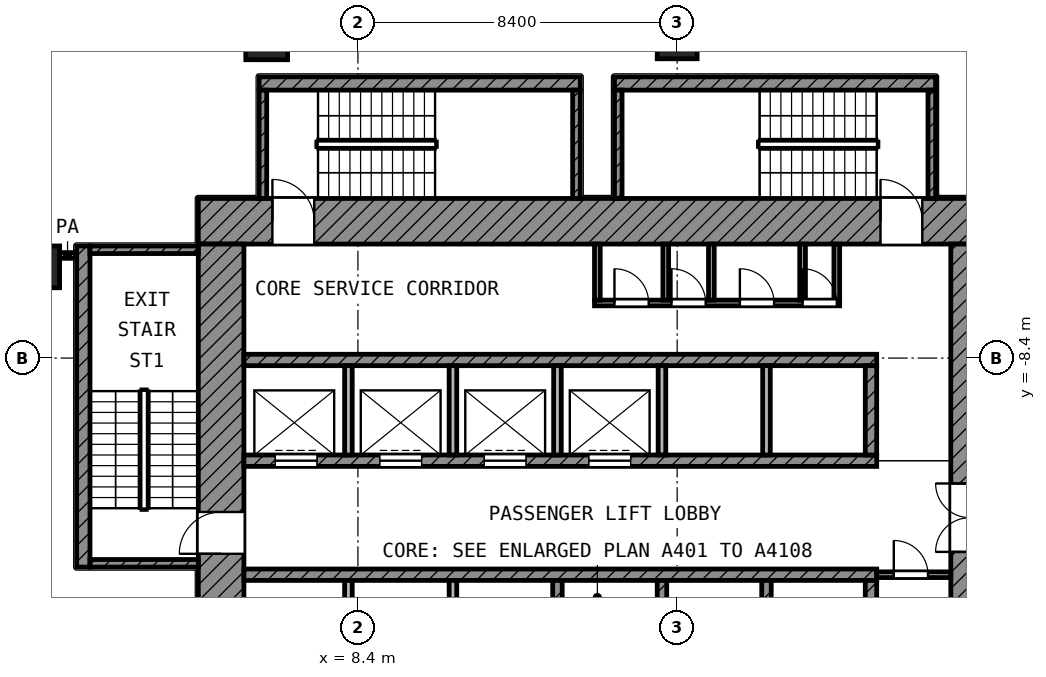
"""IFC4 building model, lengths in metres.
Left out: names, types, materials, properties, quantities, classifications, styles, units other than length and angle.
Written with IfcOpenShell. Run it as: python <this file> out.ifc"""

import sys

from ifc_helpers import new_model, si_unit, direction, frame, frame_2d, origin, origin_2d, place, context, subcontext, project, spatial, rectangle, extrude, element, fill, save


model = new_model("IFC4")
c1 = context("Model", 3, precision=1e-05, world=origin(), true_north=direction((0.0, 1.0)))
c2 = subcontext(c1, "Body", "Model", "MODEL_VIEW")
j1 = project(units=[si_unit("LENGTHUNIT", "METRE"), si_unit("PLANEANGLEUNIT", "RADIAN")], contexts=[c1])
p1 = place(None, origin())
s1 = spatial("IfcSite", under=j1, at=p1, CompositionType="ELEMENT")
p2 = place(p1, origin())
s2 = spatial("IfcBuilding", under=s1, at=p2, CompositionType="ELEMENT")
p3 = place(p2, frame((0.0, 0.0, 149.2)))
s3 = spatial("IfcBuildingStorey", under=s2, at=p3, CompositionType="ELEMENT", Elevation=149.2)
p4 = place(p3, frame((6.0, 0.0, 0.0), z_axis=(0.0, 0.0, 1.0), x_axis=(1.0, 0.0, 0.0)))
e1 = element("IfcColumn", 1, at=p4, inside=s3, PredefinedType="COLUMN", context=c2, shape_type="SweptSolid", body=[
    extrude(rectangle(XDim=1.1, YDim=1.1, at=origin_2d()), origin(), (0.0, 0.0, 1.0), 4.2),
])
p5 = place(p3, frame((16.8, 0.0, 0.0), z_axis=(0.0, 0.0, 1.0), x_axis=(1.0, 0.0, 0.0)))
e2 = element("IfcColumn", 2, at=p5, inside=s3, PredefinedType="COLUMN", context=c2, shape_type="SweptSolid", body=[
    extrude(rectangle(XDim=1.05, YDim=1.05, at=origin_2d()), origin(), (0.0, 0.0, 1.0), 4.2),
])
p6 = place(p3, frame((0.0, -6.0, 0.0), z_axis=(0.0, 0.0, 1.0), x_axis=(1.0, 0.0, 0.0)))
e3 = element("IfcColumn", 3, at=p6, inside=s3, PredefinedType="COLUMN", context=c2, shape_type="SweptSolid", body=[
    extrude(rectangle(XDim=1.1, YDim=1.1, at=origin_2d()), origin(), (0.0, 0.0, 1.0), 4.2),
])
p7 = place(p3, frame((4.2, -4.8, 0.0), z_axis=(0.0, 0.0, 1.0), x_axis=(1.0, 0.0, 0.0)))
e4 = element("IfcWall", 4, at=p7, inside=s3, PredefinedType="SHEAR", context=c2, shape_type="SweptSolid", body=[
    extrude(rectangle(XDim=20.8, YDim=1.2, at=frame_2d((10.4, 0.0))), origin(), (0.0, 0.0, 1.0), 3.7),
])
p8 = place(p7, frame((1.95, 0.0, 0.0)))
e5 = element("IfcOpeningElement", 5, at=p8, cuts=e4, PredefinedType="OPENING", context=c2, shape_type="SweptSolid", body=[
    extrude(rectangle(XDim=1.1, YDim=2.1, at=frame_2d((0.55, 1.05))), frame((0.0, 0.61, 0.0), z_axis=(0.0, -1.0, 0.0), x_axis=(1.0, 0.0, 0.0)), (0.0, 0.0, 1.0), 1.22),
])
p9 = place(p7, frame((17.95, 0.0, 0.0)))
e6 = element("IfcOpeningElement", 6, at=p9, cuts=e4, PredefinedType="OPENING", context=c2, shape_type="SweptSolid", body=[
    extrude(rectangle(XDim=1.1, YDim=2.1, at=frame_2d((0.55, 1.05))), frame((0.0, 0.61, 0.0), z_axis=(0.0, -1.0, 0.0), x_axis=(1.0, 0.0, 0.0)), (0.0, 0.0, 1.0), 1.22),
])
p10 = place(p3, frame((4.8, -25.0, 0.0), z_axis=(0.0, 0.0, 1.0), x_axis=(0.0, 1.0, 0.0)))
e7 = element("IfcWall", 7, at=p10, inside=s3, PredefinedType="SHEAR", context=c2, shape_type="SweptSolid", body=[
    extrude(rectangle(XDim=19.6, YDim=1.2, at=frame_2d((9.8, 0.0))), origin(), (0.0, 0.0, 1.0), 3.7),
])
p11 = place(p10, frame((11.45, 0.0, 0.0)))
e8 = element("IfcOpeningElement", 8, at=p11, cuts=e7, PredefinedType="OPENING", context=c2, shape_type="SweptSolid", body=[
    extrude(rectangle(XDim=1.1, YDim=2.1, at=frame_2d((0.55, 1.05))), frame((0.0, 0.61, 0.0), z_axis=(0.0, -1.0, 0.0), x_axis=(1.0, 0.0, 0.0)), (0.0, 0.0, 1.0), 1.22),
])
p12 = place(p10, frame((2.15, 0.0, 0.0)))
e9 = element("IfcOpeningElement", 9, at=p12, cuts=e7, PredefinedType="OPENING", context=c2, shape_type="SweptSolid", body=[
    extrude(rectangle(XDim=1.1, YDim=2.1, at=frame_2d((0.55, 1.05))), frame((0.0, 0.61, 0.0), z_axis=(0.0, -1.0, 0.0), x_axis=(1.0, 0.0, 0.0)), (0.0, 0.0, 1.0), 1.22),
])
p13 = place(p3, frame((24.5, -24.0, 0.0), z_axis=(0.0, 0.0, 1.0), x_axis=(0.0, 1.0, 0.0)))
e10 = element("IfcWall", 10, at=p13, inside=s3, PredefinedType="SHEAR", context=c2, shape_type="SweptSolid", body=[
    extrude(rectangle(XDim=18.6, YDim=1.0, at=frame_2d((9.3, 0.0))), origin(), (0.0, 0.0, 1.0), 3.7),
])
p14 = place(p13, frame((10.5, 0.0, 0.0)))
e11 = element("IfcOpeningElement", 11, at=p14, cuts=e10, PredefinedType="OPENING", context=c2, shape_type="SweptSolid", body=[
    extrude(rectangle(XDim=1.8, YDim=2.1, at=frame_2d((0.9, 1.05))), frame((0.0, 0.51, 0.0), z_axis=(0.0, -1.0, 0.0), x_axis=(1.0, 0.0, 0.0)), (0.0, 0.0, 1.0), 1.02),
])
p15 = place(p3, frame((5.4, -8.45, 0.0), z_axis=(0.0, 0.0, 1.0), x_axis=(1.0, 0.0, 0.0)))
e12 = element("IfcWall", 12, at=p15, inside=s3, PredefinedType="SHEAR", context=c2, shape_type="SweptSolid", body=[
    extrude(rectangle(XDim=16.65, YDim=0.3, at=frame_2d((8.325, 0.0))), origin(), (0.0, 0.0, 1.0), 3.7),
])
p16 = place(p3, frame((5.4, -11.1, 0.0), z_axis=(0.0, 0.0, 1.0), x_axis=(1.0, 0.0, 0.0)))
e13 = element("IfcWall", 13, at=p16, inside=s3, PredefinedType="SHEAR", context=c2, shape_type="SweptSolid", body=[
    extrude(rectangle(XDim=16.65, YDim=0.3, at=frame_2d((8.325, 0.0))), origin(), (0.0, 0.0, 1.0), 3.7),
])
p17 = place(p16, frame((0.825, 0.0, 0.0)))
e14 = element("IfcOpeningElement", 14, at=p17, cuts=e13, PredefinedType="OPENING", context=c2, shape_type="SweptSolid", body=[
    extrude(rectangle(XDim=1.1, YDim=2.1, at=frame_2d((0.55, 1.05))), frame((0.0, 0.16, 0.0), z_axis=(0.0, -1.0, 0.0), x_axis=(1.0, 0.0, 0.0)), (0.0, 0.0, 1.0), 0.32),
])
p18 = place(p16, frame((3.575, 0.0, 0.0)))
e15 = element("IfcOpeningElement", 15, at=p18, cuts=e13, PredefinedType="OPENING", context=c2, shape_type="SweptSolid", body=[
    extrude(rectangle(XDim=1.1, YDim=2.1, at=frame_2d((0.55, 1.05))), frame((0.0, 0.16, 0.0), z_axis=(0.0, -1.0, 0.0), x_axis=(1.0, 0.0, 0.0)), (0.0, 0.0, 1.0), 0.32),
])
p19 = place(p16, frame((6.325, 0.0, 0.0)))
e16 = element("IfcOpeningElement", 16, at=p19, cuts=e13, PredefinedType="OPENING", context=c2, shape_type="SweptSolid", body=[
    extrude(rectangle(XDim=1.1, YDim=2.1, at=frame_2d((0.55, 1.05))), frame((0.0, 0.16, 0.0), z_axis=(0.0, -1.0, 0.0), x_axis=(1.0, 0.0, 0.0)), (0.0, 0.0, 1.0), 0.32),
])
p20 = place(p16, frame((9.075, 0.0, 0.0)))
e17 = element("IfcOpeningElement", 17, at=p20, cuts=e13, PredefinedType="OPENING", context=c2, shape_type="SweptSolid", body=[
    extrude(rectangle(XDim=1.1, YDim=2.1, at=frame_2d((0.55, 1.05))), frame((0.0, 0.16, 0.0), z_axis=(0.0, -1.0, 0.0), x_axis=(1.0, 0.0, 0.0)), (0.0, 0.0, 1.0), 0.32),
])
p21 = place(p3, frame((5.4, -14.1, 0.0), z_axis=(0.0, 0.0, 1.0), x_axis=(1.0, 0.0, 0.0)))
e18 = element("IfcWall", 18, at=p21, inside=s3, PredefinedType="SHEAR", context=c2, shape_type="SweptSolid", body=[
    extrude(rectangle(XDim=16.65, YDim=0.3, at=frame_2d((8.325, 0.0))), origin(), (0.0, 0.0, 1.0), 3.7),
])
p22 = place(p3, frame((21.9, -10.95, 0.0), z_axis=(0.0, 0.0, 1.0), x_axis=(0.0, 1.0, 0.0)))
e19 = element("IfcWall", 19, at=p22, inside=s3, PredefinedType="SHEAR", context=c2, shape_type="SweptSolid", body=[
    extrude(rectangle(XDim=2.35, YDim=0.3, at=frame_2d((1.175, 0.0))), origin(), (0.0, 0.0, 1.0), 3.7),
])
p23 = place(p3, frame((21.9, -16.6, 0.0), z_axis=(0.0, 0.0, 1.0), x_axis=(0.0, 1.0, 0.0)))
e20 = element("IfcWall", 20, at=p23, inside=s3, PredefinedType="SHEAR", context=c2, shape_type="SweptSolid", body=[
    extrude(rectangle(XDim=2.35, YDim=0.3, at=frame_2d((1.175, 0.0))), origin(), (0.0, 0.0, 1.0), 3.7),
])
for number, where, z_axis, x_axis in (
    (21, (8.15, -10.95, 0.0), (0.0, 0.0, 1.0), (0.0, 1.0, 0.0)),
    (22, (10.9, -10.95, 0.0), (0.0, 0.0, 1.0), (0.0, 1.0, 0.0)),
    (23, (13.65, -10.95, 0.0), (0.0, 0.0, 1.0), (0.0, 1.0, 0.0)),
    (24, (16.4, -10.95, 0.0), (0.0, 0.0, 1.0), (0.0, 1.0, 0.0)),
    (25, (19.15, -10.95, 0.0), (0.0, 0.0, 1.0), (0.0, 1.0, 0.0)),
):
    element("IfcWall", number, at=place(p3, frame(where, z_axis=z_axis, x_axis=x_axis)), inside=s3, PredefinedType="PARTITIONING", context=c2, shape_type="SweptSolid", body=[
        extrude(rectangle(XDim=2.35, YDim=0.2, at=frame_2d((1.175, 0.0))), origin(), (0.0, 0.0, 1.0), 3.7),
    ])
for number, where, z_axis, x_axis in (
    (26, (8.15, -16.6, 0.0), (0.0, 0.0, 1.0), (0.0, 1.0, 0.0)),
    (27, (10.9, -16.6, 0.0), (0.0, 0.0, 1.0), (0.0, 1.0, 0.0)),
):
    element("IfcWall", number, at=place(p3, frame(where, z_axis=z_axis, x_axis=x_axis)), inside=s3, PredefinedType="PARTITIONING", context=c2, shape_type="SweptSolid", body=[
        extrude(rectangle(XDim=2.35, YDim=0.2, at=frame_2d((1.175, 0.0))), origin(), (0.0, 0.0, 1.0), 3.7),
    ])
for number, where, z_axis, x_axis in (
    (28, (13.65, -16.6, 0.0), (0.0, 0.0, 1.0), (0.0, 1.0, 0.0)),
    (29, (16.4, -16.6, 0.0), (0.0, 0.0, 1.0), (0.0, 1.0, 0.0)),
    (30, (19.15, -16.6, 0.0), (0.0, 0.0, 1.0), (0.0, 1.0, 0.0)),
):
    element("IfcWall", number, at=place(p3, frame(where, z_axis=z_axis, x_axis=x_axis)), inside=s3, PredefinedType="SHEAR", context=c2, shape_type="SweptSolid", body=[
        extrude(rectangle(XDim=2.35, YDim=0.25, at=frame_2d((1.175, 0.0))), origin(), (0.0, 0.0, 1.0), 3.7),
    ])
p24 = place(p3, frame((22.05, -14.1, 0.0), z_axis=(0.0, 0.0, 1.0), x_axis=(1.0, 0.0, 0.0)))
e31 = element("IfcWall", 31, at=p24, inside=s3, PredefinedType="PARTITIONING", context=c2, shape_type="SweptSolid", body=[
    extrude(rectangle(XDim=1.95, YDim=0.15, at=frame_2d((0.975, 0.0))), origin(), (0.0, 0.0, 1.0), 3.7),
])
p25 = place(p24, frame((0.45, 0.0, 0.0)))
e32 = element("IfcOpeningElement", 32, at=p25, cuts=e31, PredefinedType="OPENING", context=c2, shape_type="SweptSolid", body=[
    extrude(rectangle(XDim=0.9, YDim=2.1, at=frame_2d((0.45, 1.05))), frame((0.0, 0.085, 0.0), z_axis=(0.0, -1.0, 0.0), x_axis=(1.0, 0.0, 0.0)), (0.0, 0.0, 1.0), 0.17),
])
p26 = place(p3, frame((14.625, -6.95, 0.0), z_axis=(0.0, 0.0, 1.0), x_axis=(1.0, 0.0, 0.0)))
e33 = element("IfcWall", 33, at=p26, inside=s3, PredefinedType="PARTITIONING", context=c2, shape_type="SweptSolid", body=[
    extrude(rectangle(XDim=6.45, YDim=0.15, at=frame_2d((3.225, 0.0))), origin(), (0.0, 0.0, 1.0), 3.7),
])
p27 = place(p26, frame((0.525, 0.0, 0.0)))
e34 = element("IfcOpeningElement", 34, at=p27, cuts=e33, PredefinedType="OPENING", context=c2, shape_type="SweptSolid", body=[
    extrude(rectangle(XDim=0.9, YDim=2.1, at=frame_2d((0.45, 1.05))), frame((0.0, 0.085, 0.0), z_axis=(0.0, -1.0, 0.0), x_axis=(1.0, 0.0, 0.0)), (0.0, 0.0, 1.0), 0.17),
])
p28 = place(p26, frame((2.025, 0.0, 0.0)))
e35 = element("IfcOpeningElement", 35, at=p28, cuts=e33, PredefinedType="OPENING", context=c2, shape_type="SweptSolid", body=[
    extrude(rectangle(XDim=0.9, YDim=2.1, at=frame_2d((0.45, 1.05))), frame((0.0, 0.085, 0.0), z_axis=(0.0, -1.0, 0.0), x_axis=(1.0, 0.0, 0.0)), (0.0, 0.0, 1.0), 0.17),
])
p29 = place(p26, frame((3.825, 0.0, 0.0)))
e36 = element("IfcOpeningElement", 36, at=p29, cuts=e33, PredefinedType="OPENING", context=c2, shape_type="SweptSolid", body=[
    extrude(rectangle(XDim=0.9, YDim=2.1, at=frame_2d((0.45, 1.05))), frame((0.0, 0.085, 0.0), z_axis=(0.0, -1.0, 0.0), x_axis=(1.0, 0.0, 0.0)), (0.0, 0.0, 1.0), 0.17),
])
p30 = place(p26, frame((5.475, 0.0, 0.0)))
e37 = element("IfcOpeningElement", 37, at=p30, cuts=e33, PredefinedType="OPENING", context=c2, shape_type="SweptSolid", body=[
    extrude(rectangle(XDim=0.9, YDim=2.1, at=frame_2d((0.45, 1.05))), frame((0.0, 0.085, 0.0), z_axis=(0.0, -1.0, 0.0), x_axis=(1.0, 0.0, 0.0)), (0.0, 0.0, 1.0), 0.17),
])
for number, where, z_axis, x_axis in (
    (38, (14.7, -6.875, 0.0), (0.0, 0.0, 1.0), (0.0, 1.0, 0.0)),
    (39, (16.5, -6.875, 0.0), (0.0, 0.0, 1.0), (0.0, 1.0, 0.0)),
    (40, (17.7, -6.875, 0.0), (0.0, 0.0, 1.0), (0.0, 1.0, 0.0)),
    (41, (20.1, -6.875, 0.0), (0.0, 0.0, 1.0), (0.0, 1.0, 0.0)),
    (42, (21.0, -6.875, 0.0), (0.0, 0.0, 1.0), (0.0, 1.0, 0.0)),
):
    element("IfcWall", number, at=place(p3, frame(where, z_axis=z_axis, x_axis=x_axis)), inside=s3, PredefinedType="PARTITIONING", context=c2, shape_type="SweptSolid", body=[
        extrude(rectangle(XDim=1.475, YDim=0.15, at=frame_2d((0.738, 0.0))), origin(), (0.0, 0.0, 1.0), 3.7),
    ])
p31 = place(p3, frame((1.175, -13.9, 0.0), z_axis=(0.0, 0.0, 1.0), x_axis=(0.0, 1.0, 0.0)))
e43 = element("IfcWall", 43, at=p31, inside=s3, PredefinedType="SHEAR", context=c2, shape_type="SweptSolid", body=[
    extrude(rectangle(XDim=8.45, YDim=0.35, at=frame_2d((4.225, 0.0))), origin(), (0.0, 0.0, 1.0), 3.7),
])
for number, where, z_axis, x_axis in (
    (44, (1.35, -5.55, 0.0), (0.0, 0.0, 1.0), (1.0, 0.0, 0.0)),
    (45, (1.35, -13.8, 0.0), (0.0, 0.0, 1.0), (1.0, 0.0, 0.0)),
):
    element("IfcWall", number, at=place(p3, frame(where, z_axis=z_axis, x_axis=x_axis)), inside=s3, PredefinedType="SHEAR", context=c2, shape_type="SweptSolid", body=[
        extrude(rectangle(XDim=2.85, YDim=0.2, at=frame_2d((1.425, 0.0))), origin(), (0.0, 0.0, 1.0), 3.7),
    ])
p32 = place(p3, frame((5.8, -1.175, 0.0), z_axis=(0.0, 0.0, 1.0), x_axis=(1.0, 0.0, 0.0)))
e46 = element("IfcWall", 46, at=p32, inside=s3, PredefinedType="SHEAR", context=c2, shape_type="SweptSolid", body=[
    extrude(rectangle(XDim=8.45, YDim=0.35, at=frame_2d((4.225, 0.0))), origin(), (0.0, 0.0, 1.0), 3.7),
])
for number, where, z_axis, x_axis in (
    (47, (5.9, -4.2, 0.0), (0.0, 0.0, 1.0), (0.0, 1.0, 0.0)),
    (48, (14.15, -4.2, 0.0), (0.0, 0.0, 1.0), (0.0, 1.0, 0.0)),
):
    element("IfcWall", number, at=place(p3, frame(where, z_axis=z_axis, x_axis=x_axis)), inside=s3, PredefinedType="SHEAR", context=c2, shape_type="SweptSolid", body=[
        extrude(rectangle(XDim=2.85, YDim=0.2, at=frame_2d((1.425, 0.0))), origin(), (0.0, 0.0, 1.0), 3.7),
    ])
p33 = place(p3, frame((15.15, -1.175, 0.0), z_axis=(0.0, 0.0, 1.0), x_axis=(1.0, 0.0, 0.0)))
e49 = element("IfcWall", 49, at=p33, inside=s3, PredefinedType="SHEAR", context=c2, shape_type="SweptSolid", body=[
    extrude(rectangle(XDim=8.45, YDim=0.35, at=frame_2d((4.225, 0.0))), origin(), (0.0, 0.0, 1.0), 3.7),
])
for number, where, z_axis, x_axis in (
    (50, (15.25, -4.2, 0.0), (0.0, 0.0, 1.0), (0.0, 1.0, 0.0)),
    (51, (23.5, -4.2, 0.0), (0.0, 0.0, 1.0), (0.0, 1.0, 0.0)),
):
    element("IfcWall", number, at=place(p3, frame(where, z_axis=z_axis, x_axis=x_axis)), inside=s3, PredefinedType="SHEAR", context=c2, shape_type="SweptSolid", body=[
        extrude(rectangle(XDim=2.85, YDim=0.2, at=frame_2d((1.425, 0.0))), origin(), (0.0, 0.0, 1.0), 3.7),
    ])
p34 = place(p3, frame((0.55, -5.7, 0.0), z_axis=(0.0, 0.0, 1.0), x_axis=(1.0, 0.0, 0.0)))
e52 = element("IfcWall", 52, at=p34, inside=s3, PredefinedType="PARTITIONING", context=c2, shape_type="SweptSolid", body=[
    extrude(rectangle(XDim=0.42, YDim=0.15, at=frame_2d((0.21, 0.0))), origin(), (0.0, 0.0, 1.0), 3.7),
])
p35 = place(p17, origin())
e53 = element("IfcDoor", 53, at=p35, inside=s3, OperationType="DOUBLE_DOOR_SLIDING", PredefinedType="DOOR", context=c2, shape_type="SweptSolid", body=[
    extrude(rectangle(XDim=1.1, YDim=2.1, at=frame_2d((0.55, 1.05))), frame((0.0, 0.025, 0.0), z_axis=(0.0, -1.0, 0.0), x_axis=(1.0, 0.0, 0.0)), (0.0, 0.0, 1.0), 0.05),
])
fill(e14, e53)
p36 = place(p18, origin())
e54 = element("IfcDoor", 54, at=p36, inside=s3, OperationType="DOUBLE_DOOR_SLIDING", PredefinedType="DOOR", context=c2, shape_type="SweptSolid", body=[
    extrude(rectangle(XDim=1.1, YDim=2.1, at=frame_2d((0.55, 1.05))), frame((0.0, 0.025, 0.0), z_axis=(0.0, -1.0, 0.0), x_axis=(1.0, 0.0, 0.0)), (0.0, 0.0, 1.0), 0.05),
])
fill(e15, e54)
p37 = place(p19, origin())
e55 = element("IfcDoor", 55, at=p37, inside=s3, OperationType="DOUBLE_DOOR_SLIDING", PredefinedType="DOOR", context=c2, shape_type="SweptSolid", body=[
    extrude(rectangle(XDim=1.1, YDim=2.1, at=frame_2d((0.55, 1.05))), frame((0.0, 0.025, 0.0), z_axis=(0.0, -1.0, 0.0), x_axis=(1.0, 0.0, 0.0)), (0.0, 0.0, 1.0), 0.05),
])
fill(e16, e55)
p38 = place(p20, origin())
e56 = element("IfcDoor", 56, at=p38, inside=s3, OperationType="DOUBLE_DOOR_SLIDING", PredefinedType="DOOR", context=c2, shape_type="SweptSolid", body=[
    extrude(rectangle(XDim=1.1, YDim=2.1, at=frame_2d((0.55, 1.05))), frame((0.0, 0.025, 0.0), z_axis=(0.0, -1.0, 0.0), x_axis=(1.0, 0.0, 0.0)), (0.0, 0.0, 1.0), 0.05),
])
fill(e17, e56)
p39 = place(p11, origin())
e57 = element("IfcDoor", 57, at=p39, inside=s3, OperationType="SINGLE_SWING_LEFT", PredefinedType="DOOR", context=c2, shape_type="SweptSolid", body=[
    extrude(rectangle(XDim=1.1, YDim=2.1, at=frame_2d((0.55, 1.05))), frame((0.0, 0.025, 0.0), z_axis=(0.0, -1.0, 0.0), x_axis=(1.0, 0.0, 0.0)), (0.0, 0.0, 1.0), 0.05),
])
fill(e8, e57)
p40 = place(p8, origin())
e58 = element("IfcDoor", 58, at=p40, inside=s3, OperationType="SINGLE_SWING_LEFT", PredefinedType="DOOR", context=c2, shape_type="SweptSolid", body=[
    extrude(rectangle(XDim=1.1, YDim=2.1, at=frame_2d((0.55, 1.05))), frame((0.0, 0.025, 0.0), z_axis=(0.0, -1.0, 0.0), x_axis=(1.0, 0.0, 0.0)), (0.0, 0.0, 1.0), 0.05),
])
fill(e5, e58)
p41 = place(p9, origin())
e59 = element("IfcDoor", 59, at=p41, inside=s3, OperationType="SINGLE_SWING_LEFT", PredefinedType="DOOR", context=c2, shape_type="SweptSolid", body=[
    extrude(rectangle(XDim=1.1, YDim=2.1, at=frame_2d((0.55, 1.05))), frame((0.0, 0.025, 0.0), z_axis=(0.0, -1.0, 0.0), x_axis=(1.0, 0.0, 0.0)), (0.0, 0.0, 1.0), 0.05),
])
fill(e6, e59)
p42 = place(p27, origin())
e60 = element("IfcDoor", 60, at=p42, inside=s3, OperationType="SINGLE_SWING_LEFT", PredefinedType="DOOR", context=c2, shape_type="SweptSolid", body=[
    extrude(rectangle(XDim=0.9, YDim=2.1, at=frame_2d((0.45, 1.05))), frame((0.0, 0.025, 0.0), z_axis=(0.0, -1.0, 0.0), x_axis=(1.0, 0.0, 0.0)), (0.0, 0.0, 1.0), 0.05),
])
fill(e34, e60)
p43 = place(p28, origin())
e61 = element("IfcDoor", 61, at=p43, inside=s3, OperationType="SINGLE_SWING_LEFT", PredefinedType="DOOR", context=c2, shape_type="SweptSolid", body=[
    extrude(rectangle(XDim=0.9, YDim=2.1, at=frame_2d((0.45, 1.05))), frame((0.0, 0.025, 0.0), z_axis=(0.0, -1.0, 0.0), x_axis=(1.0, 0.0, 0.0)), (0.0, 0.0, 1.0), 0.05),
])
fill(e35, e61)
p44 = place(p29, origin())
e62 = element("IfcDoor", 62, at=p44, inside=s3, OperationType="SINGLE_SWING_LEFT", PredefinedType="DOOR", context=c2, shape_type="SweptSolid", body=[
    extrude(rectangle(XDim=0.9, YDim=2.1, at=frame_2d((0.45, 1.05))), frame((0.0, 0.025, 0.0), z_axis=(0.0, -1.0, 0.0), x_axis=(1.0, 0.0, 0.0)), (0.0, 0.0, 1.0), 0.05),
])
fill(e36, e62)
p45 = place(p30, origin())
e63 = element("IfcDoor", 63, at=p45, inside=s3, OperationType="SINGLE_SWING_LEFT", PredefinedType="DOOR", context=c2, shape_type="SweptSolid", body=[
    extrude(rectangle(XDim=0.9, YDim=2.1, at=frame_2d((0.45, 1.05))), frame((0.0, 0.025, 0.0), z_axis=(0.0, -1.0, 0.0), x_axis=(1.0, 0.0, 0.0)), (0.0, 0.0, 1.0), 0.05),
])
fill(e37, e63)
p46 = place(p25, origin())
e64 = element("IfcDoor", 64, at=p46, inside=s3, OperationType="SINGLE_SWING_LEFT", PredefinedType="DOOR", context=c2, shape_type="SweptSolid", body=[
    extrude(rectangle(XDim=0.9, YDim=2.1, at=frame_2d((0.45, 1.05))), frame((0.0, 0.025, 0.0), z_axis=(0.0, -1.0, 0.0), x_axis=(1.0, 0.0, 0.0)), (0.0, 0.0, 1.0), 0.05),
])
fill(e32, e64)
save(model, sys.argv[1])
